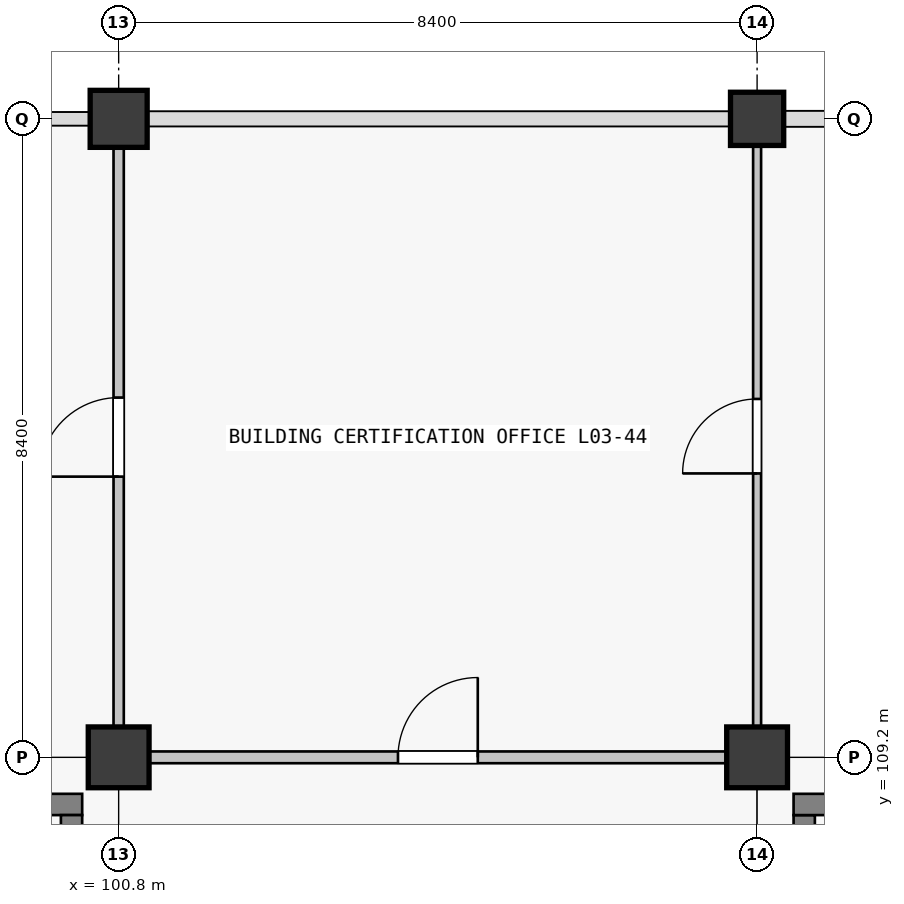
"""IFC4 building model, lengths in metres.
Left out: names, types, materials, properties, quantities, classifications, styles, units other than length and angle.
Written with IfcOpenShell. Run it as: python <this file> out.ifc"""

import sys

from ifc_helpers import new_model, si_unit, direction, frame, frame_2d, origin, origin_2d, place, context, subcontext, project, spatial, rectangle, extrude, element, fill, save


model = new_model("IFC4")
c1 = context("Model", 3, precision=1e-05, world=origin(), true_north=direction((0.0, 1.0)))
c2 = subcontext(c1, "Body", "Model", "MODEL_VIEW")
j1 = project(units=[si_unit("LENGTHUNIT", "METRE"), si_unit("PLANEANGLEUNIT", "RADIAN")], contexts=[c1])
p1 = place(None, origin())
s1 = spatial("IfcSite", under=j1, at=p1, CompositionType="ELEMENT")
p2 = place(p1, origin())
s2 = spatial("IfcBuilding", under=s1, at=p2, CompositionType="ELEMENT")
p3 = place(p2, frame((0.0, 0.0, 14.76)))
s3 = spatial("IfcBuildingStorey", under=s2, at=p3, CompositionType="ELEMENT", Elevation=14.76)
p4 = place(p3, frame((100.8, 109.2, 0.0), z_axis=(0.0, 0.0, 1.0), x_axis=(1.0, 0.0, 0.0)))
e1 = element("IfcColumn", 1, at=p4, inside=s3, PredefinedType="COLUMN", context=c2, shape_type="SweptSolid", body=[
    extrude(rectangle(XDim=0.8, YDim=0.8, at=origin_2d()), origin(), (0.0, 0.0, 1.0), 4.32),
])
p5 = place(p3, frame((100.8, 117.6, 0.0), z_axis=(0.0, 0.0, 1.0), x_axis=(1.0, 0.0, 0.0)))
e2 = element("IfcColumn", 2, at=p5, inside=s3, PredefinedType="COLUMN", context=c2, shape_type="SweptSolid", body=[
    extrude(rectangle(XDim=0.75, YDim=0.75, at=origin_2d()), origin(), (0.0, 0.0, 1.0), 4.32),
])
p6 = place(p3, frame((109.2, 109.2, 0.0), z_axis=(0.0, 0.0, 1.0), x_axis=(1.0, 0.0, 0.0)))
e3 = element("IfcColumn", 3, at=p6, inside=s3, PredefinedType="COLUMN", context=c2, shape_type="SweptSolid", body=[
    extrude(rectangle(XDim=0.8, YDim=0.8, at=origin_2d()), origin(), (0.0, 0.0, 1.0), 4.32),
])
p7 = place(p3, frame((109.2, 117.6, 0.0), z_axis=(0.0, 0.0, 1.0), x_axis=(1.0, 0.0, 0.0)))
e4 = element("IfcColumn", 4, at=p7, inside=s3, PredefinedType="COLUMN", context=c2, shape_type="SweptSolid", body=[
    extrude(rectangle(XDim=0.7, YDim=0.7, at=origin_2d()), origin(), (0.0, 0.0, 1.0), 4.32),
])
p8 = place(p3, frame((109.82, 101.56, 0.0), z_axis=(0.0, 0.0, 1.0), x_axis=(0.0, 1.0, 0.0)))
e5 = element("IfcWall", 5, at=p8, inside=s3, PredefinedType="SHEAR", context=c2, shape_type="SweptSolid", body=[
    extrude(rectangle(XDim=6.88, YDim=0.28, at=frame_2d((3.44, 0.0))), origin(), (0.0, 0.0, 1.0), 4.32),
])
for number, where, z_axis, x_axis in (
    (6, (109.68, 108.58, 0.0), (0.0, 0.0, 1.0), (1.0, 0.0, 0.0)),
    (7, (92.88, 108.58, 0.0), (0.0, 0.0, 1.0), (1.0, 0.0, 0.0)),
):
    element("IfcWall", number, at=place(p3, frame(where, z_axis=z_axis, x_axis=x_axis)), inside=s3, PredefinedType="SHEAR", context=c2, shape_type="SweptSolid", body=[
        extrude(rectangle(XDim=7.44, YDim=0.28, at=frame_2d((3.72, 0.0))), origin(), (0.0, 0.0, 1.0), 4.32),
    ])
p9 = place(p3, frame((100.18, 108.44, 0.0), z_axis=(0.0, 0.0, 1.0), x_axis=(0.0, -1.0, 0.0)))
e8 = element("IfcWall", 8, at=p9, inside=s3, PredefinedType="SHEAR", context=c2, shape_type="SweptSolid", body=[
    extrude(rectangle(XDim=6.88, YDim=0.28, at=frame_2d((3.44, 0.0))), origin(), (0.0, 0.0, 1.0), 4.32),
])
p10 = place(p9, frame((3.99, 0.0, 0.0)))
e9 = element("IfcOpeningElement", 9, at=p10, cuts=e8, PredefinedType="OPENING", context=c2, shape_type="SweptSolid", body=[
    extrude(rectangle(XDim=1.5, YDim=2.15, at=frame_2d((0.75, 1.075))), frame((0.0, 0.14, 0.0), z_axis=(0.0, -1.0, 0.0), x_axis=(1.0, 0.0, 0.0)), (0.0, 0.0, 1.0), 0.28),
])
p11 = place(p3, frame((101.202, 109.2, 0.0), z_axis=(0.0, 0.0, 1.0), x_axis=(1.0, 0.0, 0.0)))
e10 = element("IfcWall", 10, at=p11, inside=s3, PredefinedType="PARTITIONING", context=c2, shape_type="SweptSolid", body=[
    extrude(rectangle(XDim=7.596, YDim=0.155, at=frame_2d((3.798, 0.0))), origin(), (0.0, 0.0, 1.0), 3.19),
])
p12 = place(p11, frame((3.273, 0.0, 0.0)))
e11 = element("IfcOpeningElement", 11, at=p12, cuts=e10, PredefinedType="OPENING", context=c2, shape_type="SweptSolid", body=[
    extrude(rectangle(XDim=1.05, YDim=2.12, at=frame_2d((0.525, 1.06))), frame((0.0, 0.078, 0.0), z_axis=(0.0, -1.0, 0.0), x_axis=(1.0, 0.0, 0.0)), (0.0, 0.0, 1.0), 0.155),
])
p13 = place(p3, frame((100.8, 109.602, 0.0), z_axis=(0.0, 0.0, 1.0), x_axis=(0.0, 1.0, 0.0)))
e12 = element("IfcWall", 12, at=p13, inside=s3, PredefinedType="PARTITIONING", context=c2, shape_type="SweptSolid", body=[
    extrude(rectangle(XDim=7.621, YDim=0.135, at=frame_2d((3.811, 0.0))), origin(), (0.0, 0.0, 1.0), 3.19),
])
p14 = place(p13, frame((3.291, 0.0, 0.0)))
e13 = element("IfcOpeningElement", 13, at=p14, cuts=e12, PredefinedType="OPENING", context=c2, shape_type="SweptSolid", body=[
    extrude(rectangle(XDim=1.04, YDim=2.2, at=frame_2d((0.52, 1.1))), frame((0.0, 0.067, 0.0), z_axis=(0.0, -1.0, 0.0), x_axis=(1.0, 0.0, 0.0)), (0.0, 0.0, 1.0), 0.135),
])
p15 = place(p3, frame((109.2, 109.602, 0.0), z_axis=(0.0, 0.0, 1.0), x_axis=(0.0, 1.0, 0.0)))
e14 = element("IfcWall", 14, at=p15, inside=s3, PredefinedType="PARTITIONING", context=c2, shape_type="SweptSolid", body=[
    extrude(rectangle(XDim=7.646, YDim=0.105, at=frame_2d((3.823, 0.0))), origin(), (0.0, 0.0, 1.0), 3.19),
])
p16 = place(p15, frame((3.333, 0.0, 0.0)))
e15 = element("IfcOpeningElement", 15, at=p16, cuts=e14, PredefinedType="OPENING", context=c2, shape_type="SweptSolid", body=[
    extrude(rectangle(XDim=0.98, YDim=2.18, at=frame_2d((0.49, 1.09))), frame((0.0, 0.052, 0.0), z_axis=(0.0, -1.0, 0.0), x_axis=(1.0, 0.0, 0.0)), (0.0, 0.0, 1.0), 0.105),
])
p17 = place(p12, origin())
e16 = element("IfcDoor", 16, at=p17, inside=s3, OperationType="SINGLE_SWING_RIGHT", PredefinedType="DOOR", context=c2, shape_type="SweptSolid", body=[
    extrude(rectangle(XDim=1.05, YDim=2.12, at=frame_2d((0.525, 1.06))), frame((0.0, 0.025, 0.0), z_axis=(0.0, -1.0, 0.0), x_axis=(1.0, 0.0, 0.0)), (0.0, 0.0, 1.0), 0.05),
])
fill(e11, e16)
p18 = place(p16, origin())
e17 = element("IfcDoor", 17, at=p18, inside=s3, OperationType="SINGLE_SWING_LEFT", PredefinedType="DOOR", context=c2, shape_type="SweptSolid", body=[
    extrude(rectangle(XDim=0.98, YDim=2.18, at=frame_2d((0.49, 1.09))), frame((0.0, 0.025, 0.0), z_axis=(0.0, -1.0, 0.0), x_axis=(1.0, 0.0, 0.0)), (0.0, 0.0, 1.0), 0.05),
])
fill(e15, e17)
p19 = place(p14, origin())
e18 = element("IfcDoor", 18, at=p19, inside=s3, OperationType="SINGLE_SWING_LEFT", PredefinedType="DOOR", context=c2, shape_type="SweptSolid", body=[
    extrude(rectangle(XDim=1.04, YDim=2.2, at=frame_2d((0.52, 1.1))), frame((0.0, 0.025, 0.0), z_axis=(0.0, -1.0, 0.0), x_axis=(1.0, 0.0, 0.0)), (0.0, 0.0, 1.0), 0.05),
])
fill(e13, e18)
save(model, sys.argv[1])
